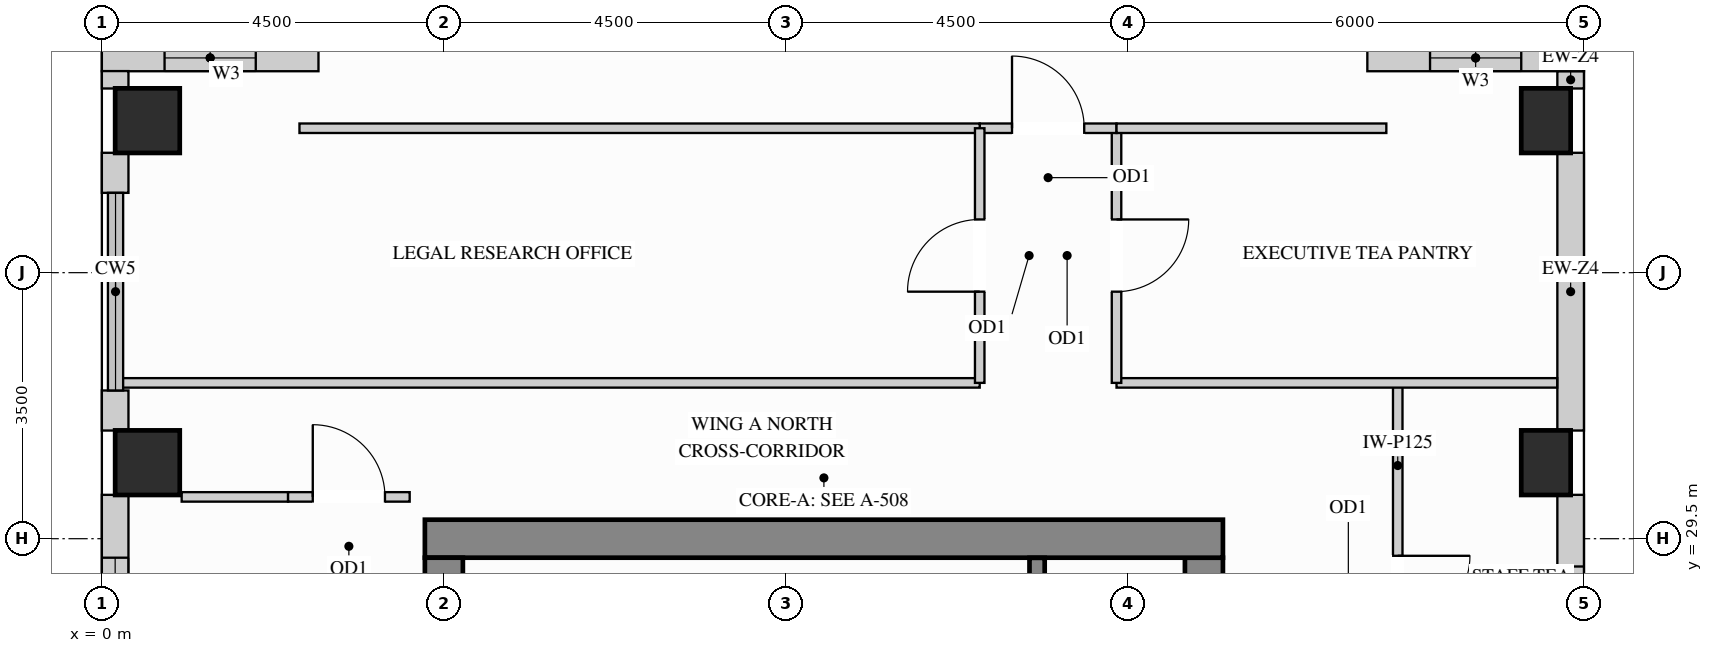
"""IFC4 building model, lengths in metres.
Left out: names, types, materials, properties, quantities, classifications, styles, units other than length and angle.
Written with IfcOpenShell. Run it as: python <this file> out.ifc"""

import sys

from ifc_helpers import new_model, si_unit, direction, frame, frame_2d, origin, origin_2d, place, context, subcontext, project, spatial, rectangle, extrude, source, transform, mapped, element, fill, save


model = new_model("IFC4")
c1 = context("Model", 3, precision=1e-05, world=origin(), true_north=direction((0.0, 1.0)))
c2 = subcontext(c1, "Body", "Model", "MODEL_VIEW")
j1 = project(units=[si_unit("LENGTHUNIT", "METRE"), si_unit("PLANEANGLEUNIT", "RADIAN")], contexts=[c1])
p1 = place(None, origin())
s1 = spatial("IfcSite", under=j1, at=p1, CompositionType="ELEMENT")
p2 = place(p1, origin())
s2 = spatial("IfcBuilding", under=s1, at=p2, CompositionType="ELEMENT")
p3 = place(p2, frame((0.0, 0.0, 244.8)))
s3 = spatial("IfcBuildingStorey", under=s2, at=p3, CompositionType="ELEMENT", Elevation=244.8)
m1 = source(origin(), c2, "Body", "SweptSolid", [
    extrude(rectangle(XDim=0.65, YDim=0.85, at=origin_2d()), origin(), (0.0, 0.0, 1.0), 3.4),
])
for number, where, z_axis, x_axis in (
    (1, (19.0, 30.5, 0.0), (0.0, 0.0, 1.0), (1.0, 0.0, 0.0)),
    (2, (19.0, 35.0, 0.0), (0.0, 0.0, 1.0), (1.0, 0.0, 0.0)),
):
    element("IfcColumn", number, at=place(p3, frame(where, z_axis=z_axis, x_axis=x_axis)), inside=s3, PredefinedType="COLUMN", context=c2, shape_type="MappedRepresentation", body=[
        mapped(m1, transform((0.0, 0.0, 0.0), x_axis=(1.0, 0.0, 0.0), y_axis=(0.0, 1.0, 0.0), z_axis=(0.0, 0.0, 1.0))),
    ])
m2 = source(origin(), c2, "Body", "SweptSolid", [
    extrude(rectangle(XDim=0.85, YDim=0.85, at=origin_2d()), origin(), (0.0, 0.0, 1.0), 3.4),
])
for number, where, z_axis, x_axis in (
    (3, (0.6, 30.5, 0.0), (0.0, 0.0, 1.0), (1.0, 0.0, 0.0)),
    (4, (0.6, 35.0, 0.0), (0.0, 0.0, 1.0), (1.0, 0.0, 0.0)),
):
    element("IfcColumn", number, at=place(p3, frame(where, z_axis=z_axis, x_axis=x_axis)), inside=s3, PredefinedType="COLUMN", context=c2, shape_type="MappedRepresentation", body=[
        mapped(m2, transform((0.0, 0.0, 0.0), x_axis=(1.0, 0.0, 0.0), y_axis=(0.0, 1.0, 0.0), z_axis=(0.0, 0.0, 1.0))),
    ])
m3 = source(origin(), c2, "Body", "SweptSolid", [
    extrude(rectangle(XDim=8.37, YDim=0.5, at=frame_2d((4.185, 0.0))), origin(), (0.0, 0.0, 1.0), 3.4),
])
p4 = place(p3, frame((14.5, 20.88, 0.0), z_axis=(0.0, 0.0, 1.0), x_axis=(0.0, 1.0, 0.0)))
e5 = element("IfcWall", 5, at=p4, inside=s3, PredefinedType="SHEAR", context=c2, shape_type="MappedRepresentation", body=[
    mapped(m3, transform((0.0, 0.0, 0.0), x_axis=(1.0, 0.0, 0.0), y_axis=(0.0, 1.0, 0.0), z_axis=(0.0, 0.0, 1.0))),
])
m4 = source(origin(), c2, "Body", "SweptSolid", [
    extrude(rectangle(XDim=10.5, YDim=0.5, at=frame_2d((5.25, 0.0))), origin(), (0.0, 0.0, 1.0), 3.4),
])
p5 = place(p3, frame((4.25, 29.5, 0.0), z_axis=(0.0, 0.0, 1.0), x_axis=(1.0, 0.0, 0.0)))
e6 = element("IfcWall", 6, at=p5, inside=s3, PredefinedType="SHEAR", context=c2, shape_type="MappedRepresentation", body=[
    mapped(m4, transform((0.0, 0.0, 0.0), x_axis=(1.0, 0.0, 0.0), y_axis=(0.0, 1.0, 0.0), z_axis=(0.0, 0.0, 1.0))),
])
m5 = source(origin(), c2, "Body", "SweptSolid", [
    extrude(rectangle(XDim=20.5, YDim=0.5, at=frame_2d((10.25, 0.0))), origin(), (0.0, 0.0, 1.0), 3.4),
])
p6 = place(p3, frame((4.5, 8.75, 0.0), z_axis=(0.0, 0.0, 1.0), x_axis=(0.0, 1.0, 0.0)))
e7 = element("IfcWall", 7, at=p6, inside=s3, PredefinedType="SHEAR", context=c2, shape_type="MappedRepresentation", body=[
    mapped(m5, transform((0.0, 0.0, 0.0), x_axis=(1.0, 0.0, 0.0), y_axis=(0.0, 1.0, 0.0), z_axis=(0.0, 0.0, 1.0))),
])
p7 = place(p3, frame((19.325, 27.223, 0.0), z_axis=(0.0, 0.0, 1.0), x_axis=(0.0, 1.0, 0.0)))
e8 = element("IfcWall", 8, at=p7, inside=s3, PredefinedType="SOLIDWALL", context=c2, shape_type="SweptSolid", body=[
    extrude(rectangle(XDim=2.854, YDim=0.35, at=frame_2d((1.427, 0.0))), origin(), (0.0, 0.0, 1.0), 2.619),
])
p8 = place(p7, frame((0.411, 0.0, 0.78)))
e9 = element("IfcOpeningElement", 9, at=p8, cuts=e8, PredefinedType="OPENING", context=c2, shape_type="SweptSolid", body=[
    extrude(rectangle(XDim=1.5, YDim=1.659, at=frame_2d((0.75, 0.83))), frame((0.0, 0.185, 0.0), z_axis=(0.0, -1.0, 0.0), x_axis=(1.0, 0.0, 0.0)), (0.0, 0.0, 1.0), 0.37),
])
m6 = source(origin(), c2, "Body", "SweptSolid", [
    extrude(rectangle(XDim=3.654, YDim=0.35, at=frame_2d((1.827, 0.0))), origin(), (0.0, 0.0, 1.0), 2.619),
])
p9 = place(p3, frame((19.325, 30.923, 0.0), z_axis=(0.0, 0.0, 1.0), x_axis=(0.0, 1.0, 0.0)))
e10 = element("IfcWall", 10, at=p9, inside=s3, PredefinedType="SOLIDWALL", context=c2, shape_type="MappedRepresentation", body=[
    mapped(m6, transform((0.0, 0.0, 0.0), x_axis=(1.0, 0.0, 0.0), y_axis=(0.0, 1.0, 0.0), z_axis=(0.0, 0.0, 1.0))),
])
m7 = source(origin(), c2, "Body", "SweptSolid", [
    extrude(rectangle(XDim=0.229, YDim=0.35, at=frame_2d((0.115, 0.0))), origin(), (0.0, 0.0, 1.0), 3.385),
])
p10 = place(p3, frame((19.325, 35.423, 0.0), z_axis=(0.0, 0.0, 1.0), x_axis=(0.0, 1.0, 0.0)))
e11 = element("IfcWall", 11, at=p10, inside=s3, PredefinedType="SOLIDWALL", context=c2, shape_type="MappedRepresentation", body=[
    mapped(m7, transform((0.0, 0.0, 0.0), x_axis=(1.0, 0.0, 0.0), y_axis=(0.0, 1.0, 0.0), z_axis=(0.0, 0.0, 1.0))),
])
p11 = place(p3, frame((19.5, 35.825, 0.0), z_axis=(0.0, 0.0, 1.0), x_axis=(-1.0, 0.0, 0.0)))
e12 = element("IfcWall", 12, at=p11, inside=s3, PredefinedType="SOLIDWALL", context=c2, shape_type="SweptSolid", body=[
    extrude(rectangle(XDim=2.85, YDim=0.35, at=frame_2d((1.425, 0.0))), origin(), (0.0, 0.0, 1.0), 3.385),
])
p12 = place(p11, frame((0.825, 0.0, 0.78)))
e13 = element("IfcOpeningElement", 13, at=p12, cuts=e12, PredefinedType="OPENING", context=c2, shape_type="SweptSolid", body=[
    extrude(rectangle(XDim=1.2, YDim=2.25, at=frame_2d((0.6, 1.125))), frame((0.0, 0.185, 0.0), z_axis=(0.0, -1.0, 0.0), x_axis=(1.0, 0.0, 0.0)), (0.0, 0.0, 1.0), 0.37),
])
p13 = place(p3, frame((2.85, 35.825, 0.0), z_axis=(0.0, 0.0, 1.0), x_axis=(-1.0, 0.0, 0.0)))
e14 = element("IfcWall", 14, at=p13, inside=s3, PredefinedType="SOLIDWALL", context=c2, shape_type="SweptSolid", body=[
    extrude(rectangle(XDim=2.85, YDim=0.35, at=frame_2d((1.425, 0.0))), origin(), (0.0, 0.0, 1.0), 3.385),
])
p14 = place(p13, frame((0.825, 0.0, 0.78)))
e15 = element("IfcOpeningElement", 15, at=p14, cuts=e14, PredefinedType="OPENING", context=c2, shape_type="SweptSolid", body=[
    extrude(rectangle(XDim=1.2, YDim=2.25, at=frame_2d((0.6, 1.125))), frame((0.0, 0.185, 0.0), z_axis=(0.0, -1.0, 0.0), x_axis=(1.0, 0.0, 0.0)), (0.0, 0.0, 1.0), 0.37),
])
p15 = place(p3, frame((0.175, 35.652, 0.0), z_axis=(0.0, 0.0, 1.0), x_axis=(0.0, -1.0, 0.0)))
e16 = element("IfcWall", 16, at=p15, inside=s3, PredefinedType="SOLIDWALL", context=c2, shape_type="MappedRepresentation", body=[
    mapped(m7, transform((0.0, 0.0, 0.0), x_axis=(1.0, 0.0, 0.0), y_axis=(0.0, 1.0, 0.0), z_axis=(0.0, 0.0, 1.0))),
])
m8 = source(origin(), c2, "Body", "SweptSolid", [
    extrude(rectangle(XDim=0.527, YDim=0.35, at=frame_2d((0.263, 0.0))), origin(), (0.0, 0.0, 1.0), 3.385),
])
for number, where, z_axis, x_axis in (
    (17, (0.175, 34.577, 0.0), (0.0, 0.0, 1.0), (0.0, -1.0, 0.0)),
    (18, (0.175, 31.45, 0.0), (0.0, 0.0, 1.0), (0.0, -1.0, 0.0)),
):
    element("IfcWall", number, at=place(p3, frame(where, z_axis=z_axis, x_axis=x_axis)), inside=s3, PredefinedType="SOLIDWALL", context=c2, shape_type="MappedRepresentation", body=[
        mapped(m8, transform((0.0, 0.0, 0.0), x_axis=(1.0, 0.0, 0.0), y_axis=(0.0, 1.0, 0.0), z_axis=(0.0, 0.0, 1.0))),
    ])
p16 = place(p3, frame((0.175, 30.077, 0.0), z_axis=(0.0, 0.0, 1.0), x_axis=(0.0, -1.0, 0.0)))
e19 = element("IfcWall", 19, at=p16, inside=s3, PredefinedType="SOLIDWALL", context=c2, shape_type="SweptSolid", body=[
    extrude(rectangle(XDim=2.854, YDim=0.35, at=frame_2d((1.427, 0.0))), origin(), (0.0, 0.0, 1.0), 3.385),
])
p17 = place(p16, frame((0.827, 0.0, 0.78)))
e20 = element("IfcOpeningElement", 20, at=p17, cuts=e19, PredefinedType="OPENING", context=c2, shape_type="SweptSolid", body=[
    extrude(rectangle(XDim=1.2, YDim=2.25, at=frame_2d((0.6, 1.125))), frame((0.0, 0.185, 0.0), z_axis=(0.0, -1.0, 0.0), x_axis=(1.0, 0.0, 0.0)), (0.0, 0.0, 1.0), 0.37),
])
p18 = place(p3, frame((17.05, 26.05, 0.0), z_axis=(0.0, 0.0, 1.0), x_axis=(0.0, 1.0, 0.0)))
e21 = element("IfcWall", 21, at=p18, inside=s3, PredefinedType="PARTITIONING", context=c2, shape_type="SweptSolid", body=[
    extrude(rectangle(XDim=5.5, YDim=0.125, at=frame_2d((2.75, 0.0))), origin(), (0.0, 0.0, 1.0), 3.385),
])
p19 = place(p18, frame((2.275, 0.0, 0.0)))
e22 = element("IfcOpeningElement", 22, at=p19, cuts=e21, PredefinedType="OPENING", context=c2, shape_type="SweptSolid", body=[
    extrude(rectangle(XDim=0.95, YDim=2.15, at=frame_2d((0.475, 1.075))), frame((0.0, 0.073, 0.0), z_axis=(0.0, -1.0, 0.0), x_axis=(1.0, 0.0, 0.0)), (0.0, 0.0, 1.0), 0.145),
])
m9 = source(origin(), c2, "Body", "SweptSolid", [
    extrude(rectangle(XDim=5.798, YDim=0.125, at=frame_2d((2.899, 0.0))), origin(), (0.0, 0.0, 1.0), 3.385),
])
p20 = place(p3, frame((13.35, 31.55, 0.0), z_axis=(0.0, 0.0, 1.0), x_axis=(1.0, 0.0, 0.0)))
e23 = element("IfcWall", 23, at=p20, inside=s3, PredefinedType="PARTITIONING", context=c2, shape_type="MappedRepresentation", body=[
    mapped(m9, transform((0.0, 0.0, 0.0), x_axis=(1.0, 0.0, 0.0), y_axis=(0.0, 1.0, 0.0), z_axis=(0.0, 0.0, 1.0))),
])
m10 = source(origin(), c2, "Body", "SweptSolid", [
    extrude(rectangle(XDim=11.34, YDim=0.125, at=frame_2d((5.67, 0.0))), origin(), (0.0, 0.0, 1.0), 3.385),
])
p21 = place(p3, frame((0.21, 31.55, 0.0), z_axis=(0.0, 0.0, 1.0), x_axis=(1.0, 0.0, 0.0)))
e24 = element("IfcWall", 24, at=p21, inside=s3, PredefinedType="PARTITIONING", context=c2, shape_type="MappedRepresentation", body=[
    mapped(m10, transform((0.0, 0.0, 0.0), x_axis=(1.0, 0.0, 0.0), y_axis=(0.0, 1.0, 0.0), z_axis=(0.0, 0.0, 1.0))),
])
m11 = source(origin(), c2, "Body", "SweptSolid", [
    extrude(rectangle(XDim=1.4, YDim=0.125, at=frame_2d((0.7, 0.0))), origin(), (0.0, 0.0, 1.0), 3.385),
])
p22 = place(p3, frame((1.05, 30.05, 0.0), z_axis=(0.0, 0.0, 1.0), x_axis=(1.0, 0.0, 0.0)))
e25 = element("IfcWall", 25, at=p22, inside=s3, PredefinedType="PARTITIONING", context=c2, shape_type="MappedRepresentation", body=[
    mapped(m11, transform((0.0, 0.0, 0.0), x_axis=(1.0, 0.0, 0.0), y_axis=(0.0, 1.0, 0.0), z_axis=(0.0, 0.0, 1.0))),
])
p23 = place(p3, frame((2.45, 30.05, 0.0), z_axis=(0.0, 0.0, 1.0), x_axis=(1.0, 0.0, 0.0)))
e26 = element("IfcWall", 26, at=p23, inside=s3, PredefinedType="PARTITIONING", context=c2, shape_type="SweptSolid", body=[
    extrude(rectangle(XDim=1.6, YDim=0.125, at=frame_2d((0.8, 0.0))), origin(), (0.0, 0.0, 1.0), 3.385),
])
p24 = place(p23, frame((0.325, 0.0, 0.0)))
e27 = element("IfcOpeningElement", 27, at=p24, cuts=e26, PredefinedType="OPENING", context=c2, shape_type="SweptSolid", body=[
    extrude(rectangle(XDim=0.95, YDim=2.15, at=frame_2d((0.475, 1.075))), frame((0.0, 0.073, 0.0), z_axis=(0.0, -1.0, 0.0), x_axis=(1.0, 0.0, 0.0)), (0.0, 0.0, 1.0), 0.145),
])
p25 = place(p3, frame((13.35, 31.55, 0.0), z_axis=(0.0, 0.0, 1.0), x_axis=(0.0, 1.0, 0.0)))
e28 = element("IfcWall", 28, at=p25, inside=s3, PredefinedType="PARTITIONING", context=c2, shape_type="SweptSolid", body=[
    extrude(rectangle(XDim=3.35, YDim=0.125, at=frame_2d((1.675, 0.0))), origin(), (0.0, 0.0, 1.0), 3.385),
])
p26 = place(p25, frame((1.2, 0.0, 0.0)))
e29 = element("IfcOpeningElement", 29, at=p26, cuts=e28, PredefinedType="OPENING", context=c2, shape_type="SweptSolid", body=[
    extrude(rectangle(XDim=0.95, YDim=2.15, at=frame_2d((0.475, 1.075))), frame((0.0, 0.073, 0.0), z_axis=(0.0, -1.0, 0.0), x_axis=(1.0, 0.0, 0.0)), (0.0, 0.0, 1.0), 0.145),
])
p27 = place(p3, frame((11.55, 34.9, 0.0), z_axis=(0.0, 0.0, 1.0), x_axis=(1.0, 0.0, 0.0)))
e30 = element("IfcWall", 30, at=p27, inside=s3, PredefinedType="PARTITIONING", context=c2, shape_type="SweptSolid", body=[
    extrude(rectangle(XDim=1.8, YDim=0.125, at=frame_2d((0.9, 0.0))), origin(), (0.0, 0.0, 1.0), 3.385),
])
p28 = place(p27, frame((0.425, 0.0, 0.0)))
e31 = element("IfcOpeningElement", 31, at=p28, cuts=e30, PredefinedType="OPENING", context=c2, shape_type="SweptSolid", body=[
    extrude(rectangle(XDim=0.95, YDim=2.15, at=frame_2d((0.475, 1.075))), frame((0.0, 0.073, 0.0), z_axis=(0.0, -1.0, 0.0), x_axis=(1.0, 0.0, 0.0)), (0.0, 0.0, 1.0), 0.145),
])
m12 = source(origin(), c2, "Body", "SweptSolid", [
    extrude(rectangle(XDim=3.55, YDim=0.125, at=frame_2d((1.775, 0.0))), origin(), (0.0, 0.0, 1.0), 3.385),
])
p29 = place(p3, frame((13.35, 34.9, 0.0), z_axis=(0.0, 0.0, 1.0), x_axis=(1.0, 0.0, 0.0)))
e32 = element("IfcWall", 32, at=p29, inside=s3, PredefinedType="PARTITIONING", context=c2, shape_type="MappedRepresentation", body=[
    mapped(m12, transform((0.0, 0.0, 0.0), x_axis=(1.0, 0.0, 0.0), y_axis=(0.0, 1.0, 0.0), z_axis=(0.0, 0.0, 1.0))),
])
m13 = source(origin(), c2, "Body", "SweptSolid", [
    extrude(rectangle(XDim=8.95, YDim=0.125, at=frame_2d((4.475, 0.0))), origin(), (0.0, 0.0, 1.0), 3.385),
])
p30 = place(p3, frame((2.6, 34.9, 0.0), z_axis=(0.0, 0.0, 1.0), x_axis=(1.0, 0.0, 0.0)))
e33 = element("IfcWall", 33, at=p30, inside=s3, PredefinedType="PARTITIONING", context=c2, shape_type="MappedRepresentation", body=[
    mapped(m13, transform((0.0, 0.0, 0.0), x_axis=(1.0, 0.0, 0.0), y_axis=(0.0, 1.0, 0.0), z_axis=(0.0, 0.0, 1.0))),
])
p31 = place(p3, frame((11.55, 31.55, 0.0), z_axis=(0.0, 0.0, 1.0), x_axis=(0.0, 1.0, 0.0)))
e34 = element("IfcWall", 34, at=p31, inside=s3, PredefinedType="PARTITIONING", context=c2, shape_type="SweptSolid", body=[
    extrude(rectangle(XDim=3.35, YDim=0.125, at=frame_2d((1.675, 0.0))), origin(), (0.0, 0.0, 1.0), 3.385),
])
p32 = place(p31, frame((1.2, 0.0, 0.0)))
e35 = element("IfcOpeningElement", 35, at=p32, cuts=e34, PredefinedType="OPENING", context=c2, shape_type="SweptSolid", body=[
    extrude(rectangle(XDim=0.95, YDim=2.15, at=frame_2d((0.475, 1.075))), frame((0.0, 0.073, 0.0), z_axis=(0.0, -1.0, 0.0), x_axis=(1.0, 0.0, 0.0)), (0.0, 0.0, 1.0), 0.145),
])
m14 = source(origin(), c2, "Body", "SweptSolid", [
    extrude(rectangle(XDim=3.803, YDim=0.2, at=frame_2d((1.901, 0.0))), origin(), (0.0, 0.0, 1.0), 3.4),
])
p33 = place(p3, frame((12.305, 25.445, 0.0), z_axis=(0.0, 0.0, 1.0), x_axis=(0.0, 1.0, 0.0)))
e36 = element("IfcWall", 36, at=p33, inside=s3, PredefinedType="SHEAR", context=c2, shape_type="MappedRepresentation", body=[
    mapped(m14, transform((0.0, 0.0, 0.0), x_axis=(1.0, 0.0, 0.0), y_axis=(0.0, 1.0, 0.0), z_axis=(0.0, 0.0, 1.0))),
])
m15 = source(origin(), c2, "Body", "SweptSolid", [
    extrude(rectangle(XDim=0.95, YDim=2.15, at=frame_2d((0.475, 1.075))), frame((0.0, 0.025, 0.0), z_axis=(0.0, -1.0, 0.0), x_axis=(1.0, 0.0, 0.0)), (0.0, 0.0, 1.0), 0.05),
])
p34 = place(p19, origin())
e37 = element("IfcDoor", 37, at=p34, inside=s3, OperationType="SINGLE_SWING_RIGHT", PredefinedType="DOOR", context=c2, shape_type="MappedRepresentation", body=[
    mapped(m15, transform((0.0, 0.0, 0.0), x_axis=(1.0, 0.0, 0.0), y_axis=(0.0, 1.0, 0.0), z_axis=(0.0, 0.0, 1.0))),
])
fill(e22, e37)
p35 = place(p26, origin())
e38 = element("IfcDoor", 38, at=p35, inside=s3, OperationType="SINGLE_SWING_RIGHT", PredefinedType="DOOR", context=c2, shape_type="MappedRepresentation", body=[
    mapped(m15, transform((0.0, 0.0, 0.0), x_axis=(1.0, 0.0, 0.0), y_axis=(0.0, 1.0, 0.0), z_axis=(0.0, 0.0, 1.0))),
])
fill(e29, e38)
p36 = place(p28, origin())
e39 = element("IfcDoor", 39, at=p36, inside=s3, OperationType="SINGLE_SWING_LEFT", PredefinedType="DOOR", context=c2, shape_type="MappedRepresentation", body=[
    mapped(m15, transform((0.0, 0.0, 0.0), x_axis=(1.0, 0.0, 0.0), y_axis=(0.0, 1.0, 0.0), z_axis=(0.0, 0.0, 1.0))),
])
fill(e31, e39)
p37 = place(p32, origin())
e40 = element("IfcDoor", 40, at=p37, inside=s3, OperationType="SINGLE_SWING_LEFT", PredefinedType="DOOR", context=c2, shape_type="MappedRepresentation", body=[
    mapped(m15, transform((0.0, 0.0, 0.0), x_axis=(1.0, 0.0, 0.0), y_axis=(0.0, 1.0, 0.0), z_axis=(0.0, 0.0, 1.0))),
])
fill(e35, e40)
p38 = place(p24, origin())
e41 = element("IfcDoor", 41, at=p38, inside=s3, OperationType="SINGLE_SWING_LEFT", PredefinedType="DOOR", context=c2, shape_type="MappedRepresentation", body=[
    mapped(m15, transform((0.0, 0.0, 0.0), x_axis=(1.0, 0.0, 0.0), y_axis=(0.0, 1.0, 0.0), z_axis=(0.0, 0.0, 1.0))),
])
fill(e27, e41)
m16 = source(origin(), c2, "Body", "SweptSolid", [
    extrude(rectangle(XDim=1.2, YDim=2.25, at=frame_2d((0.6, 1.125))), frame((0.0, 0.03, 0.0), z_axis=(0.0, -1.0, 0.0), x_axis=(1.0, 0.0, 0.0)), (0.0, 0.0, 1.0), 0.06),
])
p39 = place(p12, origin())
e42 = element("IfcWindow", 42, at=p39, inside=s3, PartitioningType="SINGLE_PANEL", PredefinedType="WINDOW", context=c2, shape_type="MappedRepresentation", body=[
    mapped(m16, transform((0.0, 0.0, 0.0), x_axis=(1.0, 0.0, 0.0), y_axis=(0.0, 1.0, 0.0), z_axis=(0.0, 0.0, 1.0))),
])
fill(e13, e42)
p40 = place(p14, origin())
e43 = element("IfcWindow", 43, at=p40, inside=s3, PartitioningType="SINGLE_PANEL", PredefinedType="WINDOW", context=c2, shape_type="MappedRepresentation", body=[
    mapped(m16, transform((0.0, 0.0, 0.0), x_axis=(1.0, 0.0, 0.0), y_axis=(0.0, 1.0, 0.0), z_axis=(0.0, 0.0, 1.0))),
])
fill(e15, e43)
p41 = place(p17, origin())
e44 = element("IfcWindow", 44, at=p41, inside=s3, PartitioningType="SINGLE_PANEL", PredefinedType="WINDOW", context=c2, shape_type="MappedRepresentation", body=[
    mapped(m16, transform((0.0, 0.0, 0.0), x_axis=(1.0, 0.0, 0.0), y_axis=(0.0, 1.0, 0.0), z_axis=(0.0, 0.0, 1.0))),
])
fill(e20, e44)
m17 = source(origin(), c2, "Body", "SweptSolid", [
    extrude(rectangle(XDim=1.5, YDim=1.659, at=frame_2d((0.75, 0.83))), frame((0.0, 0.03, 0.0), z_axis=(0.0, -1.0, 0.0), x_axis=(1.0, 0.0, 0.0)), (0.0, 0.0, 1.0), 0.06),
])
p42 = place(p8, origin())
e45 = element("IfcWindow", 45, at=p42, inside=s3, PartitioningType="SINGLE_PANEL", PredefinedType="WINDOW", context=c2, shape_type="MappedRepresentation", body=[
    mapped(m17, transform((0.0, 0.0, 0.0), x_axis=(1.0, 0.0, 0.0), y_axis=(0.0, 1.0, 0.0), z_axis=(0.0, 0.0, 1.0))),
])
fill(e9, e45)
save(model, sys.argv[1])
